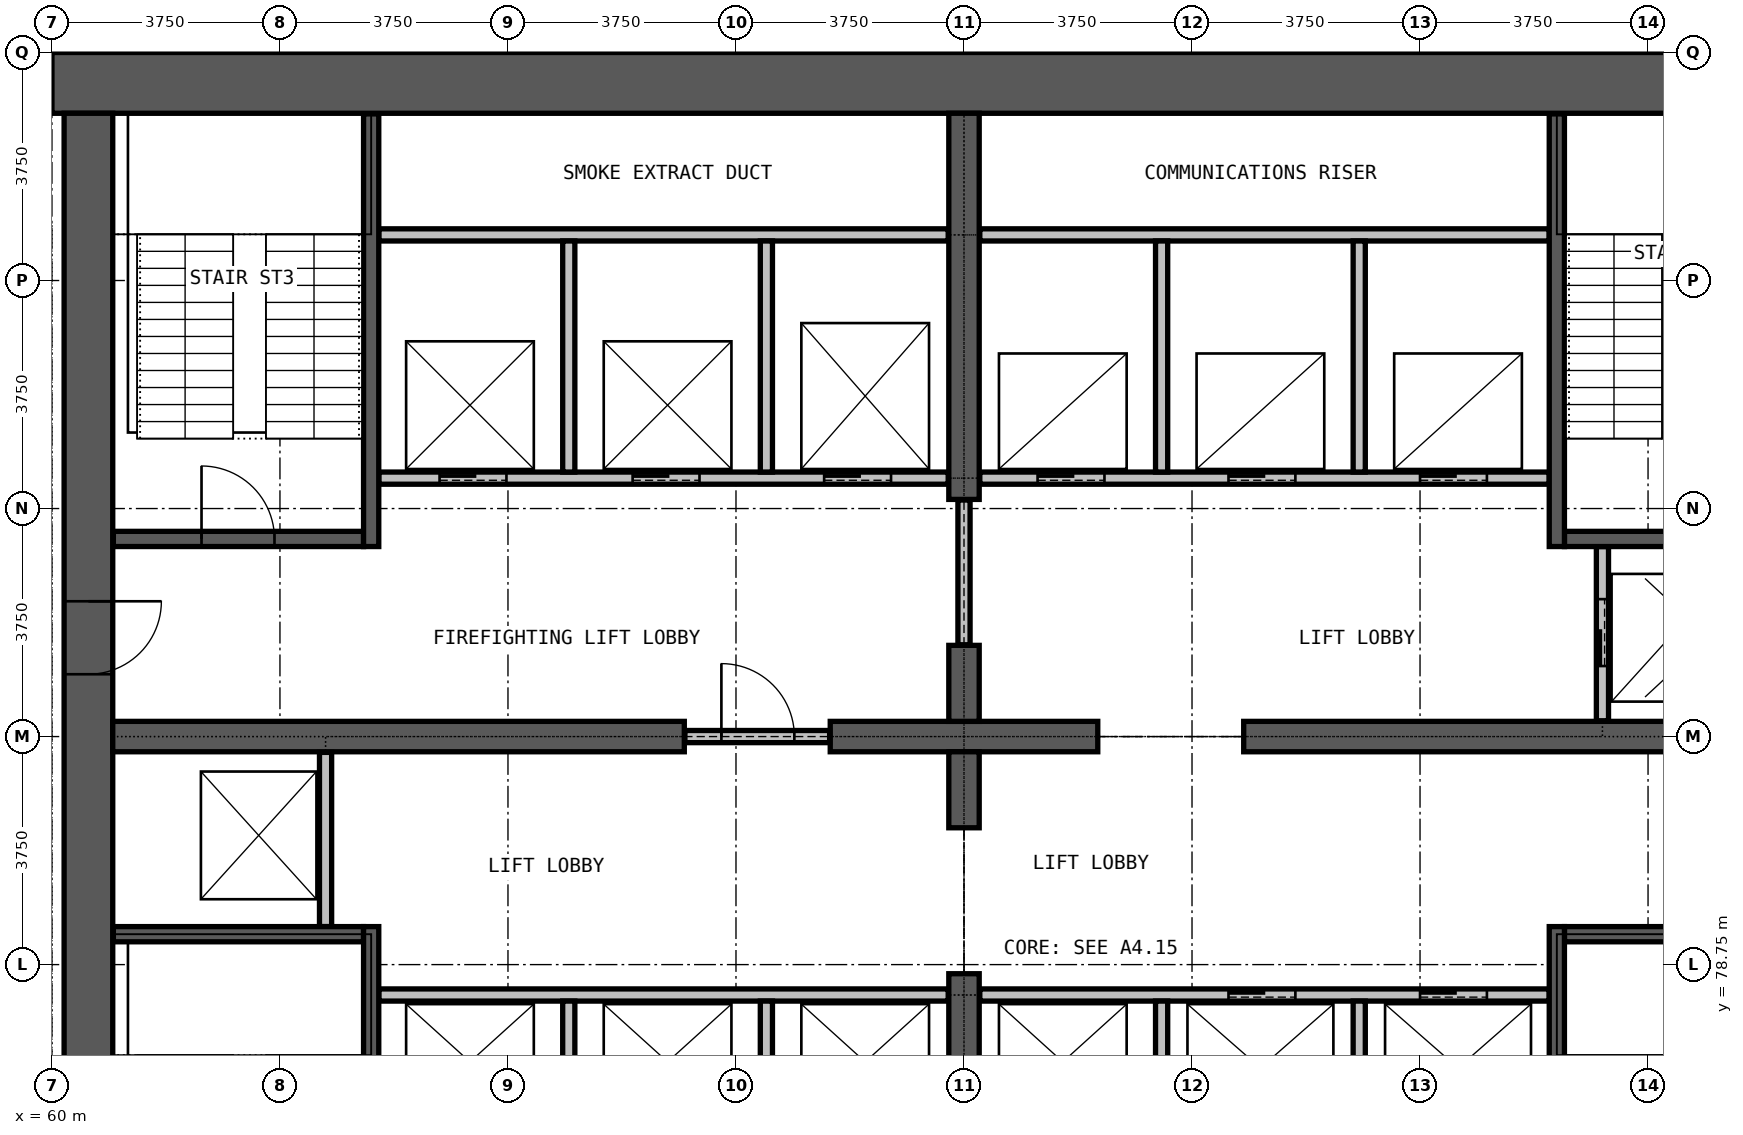
"""IFC4 building model, lengths in metres.
Left out: names, types, materials, properties, quantities, classifications, styles, units other than length and angle.
Written with IfcOpenShell. Run it as: python <this file> out.ifc"""

import sys

from ifc_helpers import new_model, si_unit, direction, frame, frame_2d, origin, place, context, subcontext, project, spatial, rectangle, extrude, element, fill, save


model = new_model("IFC4")
c1 = context("Model", 3, precision=1e-05, world=origin(), true_north=direction((0.0, 1.0)))
c2 = subcontext(c1, "Body", "Model", "MODEL_VIEW")
j1 = project(units=[si_unit("LENGTHUNIT", "METRE"), si_unit("PLANEANGLEUNIT", "RADIAN")], contexts=[c1])
p1 = place(None, origin())
s1 = spatial("IfcSite", under=j1, at=p1, CompositionType="ELEMENT")
p2 = place(p1, origin())
s2 = spatial("IfcBuilding", under=s1, at=p2, CompositionType="ELEMENT")
p3 = place(p2, frame((0.0, 0.0, 143.2)))
s3 = spatial("IfcBuildingStorey", under=s2, at=p3, CompositionType="ELEMENT", Elevation=143.2)
p4 = place(p3, frame((90.0, 93.25, 0.0), z_axis=(0.0, 0.0, 1.0), x_axis=(-1.0, 0.0, 0.0)))
e1 = element("IfcWall", 1, at=p4, inside=s3, PredefinedType="SHEAR", context=c2, shape_type="SweptSolid", body=[
    extrude(rectangle(XDim=30.0, YDim=1.0, at=frame_2d((15.0, 0.0))), origin(), (0.0, 0.0, 1.0), 4.5),
])
p5 = place(p3, frame((60.6, 92.75, 0.0), z_axis=(0.0, 0.0, 1.0), x_axis=(0.0, -1.0, 0.0)))
e2 = element("IfcWall", 2, at=p5, inside=s3, PredefinedType="SHEAR", context=c2, shape_type="SweptSolid", body=[
    extrude(rectangle(XDim=20.5, YDim=0.8, at=frame_2d((10.25, 0.0))), origin(), (0.0, 0.0, 1.0), 4.5),
])
p6 = place(p5, frame((19.025, 0.0, 0.0)))
e3 = element("IfcOpeningElement", 3, at=p6, cuts=e2, PredefinedType="OPENING", context=c2, shape_type="SweptSolid", body=[
    extrude(rectangle(XDim=1.2, YDim=2.2, at=frame_2d((0.6, 1.1))), frame((0.0, 0.41, 0.0), z_axis=(0.0, -1.0, 0.0), x_axis=(1.0, 0.0, 0.0)), (0.0, 0.0, 1.0), 0.82),
])
p7 = place(p5, frame((8.025, 0.0, 0.0)))
e4 = element("IfcOpeningElement", 4, at=p7, cuts=e2, PredefinedType="OPENING", context=c2, shape_type="SweptSolid", body=[
    extrude(rectangle(XDim=1.2, YDim=2.2, at=frame_2d((0.6, 1.1))), frame((0.0, 0.41, 0.0), z_axis=(0.0, -1.0, 0.0), x_axis=(1.0, 0.0, 0.0)), (0.0, 0.0, 1.0), 0.82),
])
p8 = place(p3, frame((61.0, 82.5, 0.0), z_axis=(0.0, 0.0, 1.0), x_axis=(1.0, 0.0, 0.0)))
e5 = element("IfcWall", 5, at=p8, inside=s3, PredefinedType="SHEAR", context=c2, shape_type="SweptSolid", body=[
    extrude(rectangle(XDim=9.4, YDim=0.5, at=frame_2d((4.7, 0.0))), origin(), (0.0, 0.0, 1.0), 4.5),
])
p9 = place(p3, frame((72.8, 82.5, 0.0), z_axis=(0.0, 0.0, 1.0), x_axis=(1.0, 0.0, 0.0)))
e6 = element("IfcWall", 6, at=p9, inside=s3, PredefinedType="SHEAR", context=c2, shape_type="SweptSolid", body=[
    extrude(rectangle(XDim=4.4, YDim=0.5, at=frame_2d((2.2, 0.0))), origin(), (0.0, 0.0, 1.0), 4.5),
])
p10 = place(p3, frame((79.6, 82.5, 0.0), z_axis=(0.0, 0.0, 1.0), x_axis=(1.0, 0.0, 0.0)))
e7 = element("IfcWall", 7, at=p10, inside=s3, PredefinedType="SHEAR", context=c2, shape_type="SweptSolid", body=[
    extrude(rectangle(XDim=9.4, YDim=0.5, at=frame_2d((4.7, 0.0))), origin(), (0.0, 0.0, 1.0), 4.5),
])
p11 = place(p3, frame((75.0, 72.25, 0.0), z_axis=(0.0, 0.0, 1.0), x_axis=(0.0, 1.0, 0.0)))
e8 = element("IfcWall", 8, at=p11, inside=s3, PredefinedType="SHEAR", context=c2, shape_type="SweptSolid", body=[
    extrude(rectangle(XDim=6.35, YDim=0.5, at=frame_2d((3.175, 0.0))), origin(), (0.0, 0.0, 1.0), 4.5),
])
for number, where, z_axis, x_axis in (
    (9, (75.0, 81.0, 0.0), (0.0, 0.0, 1.0), (0.0, 1.0, 0.0)),
    (10, (75.0, 82.75, 0.0), (0.0, 0.0, 1.0), (0.0, 1.0, 0.0)),
):
    element("IfcWall", number, at=place(p3, frame(where, z_axis=z_axis, x_axis=x_axis)), inside=s3, PredefinedType="SHEAR", context=c2, shape_type="SweptSolid", body=[
        extrude(rectangle(XDim=1.25, YDim=0.5, at=frame_2d((0.625, 0.0))), origin(), (0.0, 0.0, 1.0), 4.5),
    ])
p12 = place(p3, frame((75.0, 86.4, 0.0), z_axis=(0.0, 0.0, 1.0), x_axis=(0.0, 1.0, 0.0)))
e11 = element("IfcWall", 11, at=p12, inside=s3, PredefinedType="SHEAR", context=c2, shape_type="SweptSolid", body=[
    extrude(rectangle(XDim=6.35, YDim=0.5, at=frame_2d((3.175, 0.0))), origin(), (0.0, 0.0, 1.0), 4.5),
])
p13 = place(p3, frame((70.41, 82.5, 0.0), z_axis=(0.0, 0.0, 1.0), x_axis=(1.0, 0.0, 0.0)))
e12 = element("IfcWall", 12, at=p13, inside=s3, PredefinedType="PARTITIONING", context=c2, shape_type="SweptSolid", body=[
    extrude(rectangle(XDim=2.38, YDim=0.2, at=frame_2d((1.19, 0.0))), origin(), (0.0, 0.0, 1.0), 2.4),
])
p14 = place(p13, frame((0.6, 0.0, 0.0)))
e13 = element("IfcOpeningElement", 13, at=p14, cuts=e12, PredefinedType="OPENING", context=c2, shape_type="SweptSolid", body=[
    extrude(rectangle(XDim=1.2, YDim=2.2, at=frame_2d((0.6, 1.1))), frame((0.0, 0.11, 0.0), z_axis=(0.0, -1.0, 0.0), x_axis=(1.0, 0.0, 0.0)), (0.0, 0.0, 1.0), 0.22),
])
p15 = place(p3, frame((75.0, 84.01, 0.0), z_axis=(0.0, 0.0, 1.0), x_axis=(0.0, 1.0, 0.0)))
e14 = element("IfcWall", 14, at=p15, inside=s3, PredefinedType="PARTITIONING", context=c2, shape_type="SweptSolid", body=[
    extrude(rectangle(XDim=2.38, YDim=0.2, at=frame_2d((1.19, 0.0))), origin(), (0.0, 0.0, 1.0), 2.4),
])
p16 = place(p3, frame((65.375, 78.25, 0.0), z_axis=(0.0, 0.0, 1.0), x_axis=(1.0, 0.0, 0.0)))
e15 = element("IfcWall", 15, at=p16, inside=s3, PredefinedType="PARTITIONING", context=c2, shape_type="SweptSolid", body=[
    extrude(rectangle(XDim=9.365, YDim=0.2, at=frame_2d((4.683, 0.0))), origin(), (0.0, 0.0, 1.0), 4.2),
])
p17 = place(p3, frame((75.26, 78.25, 0.0), z_axis=(0.0, 0.0, 1.0), x_axis=(1.0, 0.0, 0.0)))
e16 = element("IfcWall", 16, at=p17, inside=s3, PredefinedType="PARTITIONING", context=c2, shape_type="SweptSolid", body=[
    extrude(rectangle(XDim=9.365, YDim=0.2, at=frame_2d((4.683, 0.0))), origin(), (0.0, 0.0, 1.0), 4.2),
])
p18 = place(p17, frame((4.09, 0.0, 0.0)))
e17 = element("IfcOpeningElement", 17, at=p18, cuts=e16, PredefinedType="OPENING", context=c2, shape_type="SweptSolid", body=[
    extrude(rectangle(XDim=1.1, YDim=2.2, at=frame_2d((0.55, 1.1))), frame((0.0, 0.11, 0.0), z_axis=(0.0, -1.0, 0.0), x_axis=(1.0, 0.0, 0.0)), (0.0, 0.0, 1.0), 0.22),
])
p19 = place(p17, frame((7.24, 0.0, 0.0)))
e18 = element("IfcOpeningElement", 18, at=p19, cuts=e16, PredefinedType="OPENING", context=c2, shape_type="SweptSolid", body=[
    extrude(rectangle(XDim=1.1, YDim=2.2, at=frame_2d((0.55, 1.1))), frame((0.0, 0.11, 0.0), z_axis=(0.0, -1.0, 0.0), x_axis=(1.0, 0.0, 0.0)), (0.0, 0.0, 1.0), 0.22),
])
p20 = place(p3, frame((65.375, 86.75, 0.0), z_axis=(0.0, 0.0, 1.0), x_axis=(1.0, 0.0, 0.0)))
e19 = element("IfcWall", 19, at=p20, inside=s3, PredefinedType="PARTITIONING", context=c2, shape_type="SweptSolid", body=[
    extrude(rectangle(XDim=9.365, YDim=0.2, at=frame_2d((4.683, 0.0))), origin(), (0.0, 0.0, 1.0), 4.2),
])
p21 = place(p20, frame((1.0, 0.0, 0.0)))
e20 = element("IfcOpeningElement", 20, at=p21, cuts=e19, PredefinedType="OPENING", context=c2, shape_type="SweptSolid", body=[
    extrude(rectangle(XDim=1.1, YDim=2.2, at=frame_2d((0.55, 1.1))), frame((0.0, 0.11, 0.0), z_axis=(0.0, -1.0, 0.0), x_axis=(1.0, 0.0, 0.0)), (0.0, 0.0, 1.0), 0.22),
])
p22 = place(p20, frame((4.175, 0.0, 0.0)))
e21 = element("IfcOpeningElement", 21, at=p22, cuts=e19, PredefinedType="OPENING", context=c2, shape_type="SweptSolid", body=[
    extrude(rectangle(XDim=1.1, YDim=2.2, at=frame_2d((0.55, 1.1))), frame((0.0, 0.11, 0.0), z_axis=(0.0, -1.0, 0.0), x_axis=(1.0, 0.0, 0.0)), (0.0, 0.0, 1.0), 0.22),
])
p23 = place(p20, frame((7.325, 0.0, 0.0)))
e22 = element("IfcOpeningElement", 22, at=p23, cuts=e19, PredefinedType="OPENING", context=c2, shape_type="SweptSolid", body=[
    extrude(rectangle(XDim=1.1, YDim=2.2, at=frame_2d((0.55, 1.1))), frame((0.0, 0.11, 0.0), z_axis=(0.0, -1.0, 0.0), x_axis=(1.0, 0.0, 0.0)), (0.0, 0.0, 1.0), 0.22),
])
p24 = place(p3, frame((75.26, 86.75, 0.0), z_axis=(0.0, 0.0, 1.0), x_axis=(1.0, 0.0, 0.0)))
e23 = element("IfcWall", 23, at=p24, inside=s3, PredefinedType="PARTITIONING", context=c2, shape_type="SweptSolid", body=[
    extrude(rectangle(XDim=9.365, YDim=0.2, at=frame_2d((4.683, 0.0))), origin(), (0.0, 0.0, 1.0), 4.2),
])
p25 = place(p24, frame((0.95, 0.0, 0.0)))
e24 = element("IfcOpeningElement", 24, at=p25, cuts=e23, PredefinedType="OPENING", context=c2, shape_type="SweptSolid", body=[
    extrude(rectangle(XDim=1.1, YDim=2.2, at=frame_2d((0.55, 1.1))), frame((0.0, 0.11, 0.0), z_axis=(0.0, -1.0, 0.0), x_axis=(1.0, 0.0, 0.0)), (0.0, 0.0, 1.0), 0.22),
])
p26 = place(p24, frame((4.09, 0.0, 0.0)))
e25 = element("IfcOpeningElement", 25, at=p26, cuts=e23, PredefinedType="OPENING", context=c2, shape_type="SweptSolid", body=[
    extrude(rectangle(XDim=1.1, YDim=2.2, at=frame_2d((0.55, 1.1))), frame((0.0, 0.11, 0.0), z_axis=(0.0, -1.0, 0.0), x_axis=(1.0, 0.0, 0.0)), (0.0, 0.0, 1.0), 0.22),
])
p27 = place(p24, frame((7.24, 0.0, 0.0)))
e26 = element("IfcOpeningElement", 26, at=p27, cuts=e23, PredefinedType="OPENING", context=c2, shape_type="SweptSolid", body=[
    extrude(rectangle(XDim=1.1, YDim=2.2, at=frame_2d((0.55, 1.1))), frame((0.0, 0.11, 0.0), z_axis=(0.0, -1.0, 0.0), x_axis=(1.0, 0.0, 0.0)), (0.0, 0.0, 1.0), 0.22),
])
for number, where, z_axis, x_axis in (
    (27, (65.375, 90.75, 0.0), (0.0, 0.0, 1.0), (1.0, 0.0, 0.0)),
    (28, (75.26, 90.75, 0.0), (0.0, 0.0, 1.0), (1.0, 0.0, 0.0)),
):
    element("IfcWall", number, at=place(p3, frame(where, z_axis=z_axis, x_axis=x_axis)), inside=s3, PredefinedType="PARTITIONING", context=c2, shape_type="SweptSolid", body=[
        extrude(rectangle(XDim=9.365, YDim=0.2, at=frame_2d((4.683, 0.0))), origin(), (0.0, 0.0, 1.0), 4.2),
    ])
p28 = place(p3, frame((64.5, 79.375, 0.0), z_axis=(0.0, 0.0, 1.0), x_axis=(0.0, 1.0, 0.0)))
e29 = element("IfcWall", 29, at=p28, inside=s3, PredefinedType="PARTITIONING", context=c2, shape_type="SweptSolid", body=[
    extrude(rectangle(XDim=2.865, YDim=0.2, at=frame_2d((1.433, 0.0))), origin(), (0.0, 0.0, 1.0), 4.2),
])
for number, where, z_axis, x_axis in (
    (30, (68.5, 74.35, 0.0), (0.0, 0.0, 1.0), (0.0, 1.0, 0.0)),
    (31, (68.5, 86.85, 0.0), (0.0, 0.0, 1.0), (0.0, 1.0, 0.0)),
    (32, (71.75, 74.35, 0.0), (0.0, 0.0, 1.0), (0.0, 1.0, 0.0)),
    (33, (71.75, 86.85, 0.0), (0.0, 0.0, 1.0), (0.0, 1.0, 0.0)),
    (34, (78.25, 74.35, 0.0), (0.0, 0.0, 1.0), (0.0, 1.0, 0.0)),
    (35, (78.25, 86.85, 0.0), (0.0, 0.0, 1.0), (0.0, 1.0, 0.0)),
    (36, (81.5, 74.35, 0.0), (0.0, 0.0, 1.0), (0.0, 1.0, 0.0)),
    (37, (81.5, 86.85, 0.0), (0.0, 0.0, 1.0), (0.0, 1.0, 0.0)),
):
    element("IfcWall", number, at=place(p3, frame(where, z_axis=z_axis, x_axis=x_axis)), inside=s3, PredefinedType="PARTITIONING", context=c2, shape_type="SweptSolid", body=[
        extrude(rectangle(XDim=3.8, YDim=0.2, at=frame_2d((1.9, 0.0))), origin(), (0.0, 0.0, 1.0), 4.2),
    ])
p29 = place(p3, frame((85.5, 82.76, 0.0), z_axis=(0.0, 0.0, 1.0), x_axis=(0.0, 1.0, 0.0)))
e38 = element("IfcWall", 38, at=p29, inside=s3, PredefinedType="PARTITIONING", context=c2, shape_type="SweptSolid", body=[
    extrude(rectangle(XDim=2.865, YDim=0.2, at=frame_2d((1.433, 0.0))), origin(), (0.0, 0.0, 1.0), 4.2),
])
p30 = place(p29, frame((0.9, 0.0, 0.0)))
e39 = element("IfcOpeningElement", 39, at=p30, cuts=e38, PredefinedType="OPENING", context=c2, shape_type="SweptSolid", body=[
    extrude(rectangle(XDim=1.1, YDim=2.2, at=frame_2d((0.55, 1.1))), frame((0.0, 0.11, 0.0), z_axis=(0.0, -1.0, 0.0), x_axis=(1.0, 0.0, 0.0)), (0.0, 0.0, 1.0), 0.22),
])
p31 = place(p3, frame((61.01, 79.25, 0.0), z_axis=(0.0, 0.0, 1.0), x_axis=(1.0, 0.0, 0.0)))
e40 = element("IfcWall", 40, at=p31, inside=s3, PredefinedType="PARTITIONING", context=c2, shape_type="SweptSolid", body=[
    extrude(rectangle(XDim=4.115, YDim=0.25, at=frame_2d((2.058, 0.0))), origin(), (0.0, 0.0, 1.0), 4.2),
])
p32 = place(p3, frame((84.875, 79.25, 0.0), z_axis=(0.0, 0.0, 1.0), x_axis=(1.0, 0.0, 0.0)))
e41 = element("IfcWall", 41, at=p32, inside=s3, PredefinedType="PARTITIONING", context=c2, shape_type="SweptSolid", body=[
    extrude(rectangle(XDim=4.125, YDim=0.25, at=frame_2d((2.062, 0.0))), origin(), (0.0, 0.0, 1.0), 4.2),
])
p33 = place(p3, frame((61.01, 85.75, 0.0), z_axis=(0.0, 0.0, 1.0), x_axis=(1.0, 0.0, 0.0)))
e42 = element("IfcWall", 42, at=p33, inside=s3, PredefinedType="PARTITIONING", context=c2, shape_type="SweptSolid", body=[
    extrude(rectangle(XDim=4.115, YDim=0.25, at=frame_2d((2.058, 0.0))), origin(), (0.0, 0.0, 1.0), 4.2),
])
p34 = place(p33, frame((1.45, 0.0, 0.0)))
e43 = element("IfcOpeningElement", 43, at=p34, cuts=e42, PredefinedType="OPENING", context=c2, shape_type="SweptSolid", body=[
    extrude(rectangle(XDim=1.2, YDim=2.2, at=frame_2d((0.6, 1.1))), frame((0.0, 0.135, 0.0), z_axis=(0.0, -1.0, 0.0), x_axis=(1.0, 0.0, 0.0)), (0.0, 0.0, 1.0), 0.27),
])
p35 = place(p3, frame((84.875, 85.75, 0.0), z_axis=(0.0, 0.0, 1.0), x_axis=(1.0, 0.0, 0.0)))
e44 = element("IfcWall", 44, at=p35, inside=s3, PredefinedType="PARTITIONING", context=c2, shape_type="SweptSolid", body=[
    extrude(rectangle(XDim=4.125, YDim=0.25, at=frame_2d((2.062, 0.0))), origin(), (0.0, 0.0, 1.0), 4.2),
])
p36 = place(p3, frame((65.25, 72.25, 0.0), z_axis=(0.0, 0.0, 1.0), x_axis=(0.0, 1.0, 0.0)))
e45 = element("IfcWall", 45, at=p36, inside=s3, PredefinedType="PARTITIONING", context=c2, shape_type="SweptSolid", body=[
    extrude(rectangle(XDim=7.125, YDim=0.25, at=frame_2d((3.562, 0.0))), origin(), (0.0, 0.0, 1.0), 4.2),
])
p37 = place(p3, frame((65.25, 85.625, 0.0), z_axis=(0.0, 0.0, 1.0), x_axis=(0.0, 1.0, 0.0)))
e46 = element("IfcWall", 46, at=p37, inside=s3, PredefinedType="PARTITIONING", context=c2, shape_type="SweptSolid", body=[
    extrude(rectangle(XDim=7.115, YDim=0.25, at=frame_2d((3.558, 0.0))), origin(), (0.0, 0.0, 1.0), 4.2),
])
p38 = place(p3, frame((84.75, 72.25, 0.0), z_axis=(0.0, 0.0, 1.0), x_axis=(0.0, 1.0, 0.0)))
e47 = element("IfcWall", 47, at=p38, inside=s3, PredefinedType="PARTITIONING", context=c2, shape_type="SweptSolid", body=[
    extrude(rectangle(XDim=7.125, YDim=0.25, at=frame_2d((3.562, 0.0))), origin(), (0.0, 0.0, 1.0), 4.2),
])
p39 = place(p3, frame((84.75, 85.625, 0.0), z_axis=(0.0, 0.0, 1.0), x_axis=(0.0, 1.0, 0.0)))
e48 = element("IfcWall", 48, at=p39, inside=s3, PredefinedType="PARTITIONING", context=c2, shape_type="SweptSolid", body=[
    extrude(rectangle(XDim=7.115, YDim=0.25, at=frame_2d((3.558, 0.0))), origin(), (0.0, 0.0, 1.0), 4.2),
])
p40 = place(p18, origin())
e49 = element("IfcDoor", 49, at=p40, inside=s3, OperationType="DOUBLE_DOOR_SLIDING", PredefinedType="DOOR", context=c2, shape_type="SweptSolid", body=[
    extrude(rectangle(XDim=1.1, YDim=2.2, at=frame_2d((0.55, 1.1))), frame((0.0, 0.025, 0.0), z_axis=(0.0, -1.0, 0.0), x_axis=(1.0, 0.0, 0.0)), (0.0, 0.0, 1.0), 0.05),
])
fill(e17, e49)
p41 = place(p19, origin())
e50 = element("IfcDoor", 50, at=p41, inside=s3, OperationType="DOUBLE_DOOR_SLIDING", PredefinedType="DOOR", context=c2, shape_type="SweptSolid", body=[
    extrude(rectangle(XDim=1.1, YDim=2.2, at=frame_2d((0.55, 1.1))), frame((0.0, 0.025, 0.0), z_axis=(0.0, -1.0, 0.0), x_axis=(1.0, 0.0, 0.0)), (0.0, 0.0, 1.0), 0.05),
])
fill(e18, e50)
p42 = place(p25, origin())
e51 = element("IfcDoor", 51, at=p42, inside=s3, OperationType="DOUBLE_DOOR_SLIDING", PredefinedType="DOOR", context=c2, shape_type="SweptSolid", body=[
    extrude(rectangle(XDim=1.1, YDim=2.2, at=frame_2d((0.55, 1.1))), frame((0.0, 0.025, 0.0), z_axis=(0.0, -1.0, 0.0), x_axis=(1.0, 0.0, 0.0)), (0.0, 0.0, 1.0), 0.05),
])
fill(e24, e51)
p43 = place(p26, origin())
e52 = element("IfcDoor", 52, at=p43, inside=s3, OperationType="DOUBLE_DOOR_SLIDING", PredefinedType="DOOR", context=c2, shape_type="SweptSolid", body=[
    extrude(rectangle(XDim=1.1, YDim=2.2, at=frame_2d((0.55, 1.1))), frame((0.0, 0.025, 0.0), z_axis=(0.0, -1.0, 0.0), x_axis=(1.0, 0.0, 0.0)), (0.0, 0.0, 1.0), 0.05),
])
fill(e25, e52)
p44 = place(p27, origin())
e53 = element("IfcDoor", 53, at=p44, inside=s3, OperationType="DOUBLE_DOOR_SLIDING", PredefinedType="DOOR", context=c2, shape_type="SweptSolid", body=[
    extrude(rectangle(XDim=1.1, YDim=2.2, at=frame_2d((0.55, 1.1))), frame((0.0, 0.025, 0.0), z_axis=(0.0, -1.0, 0.0), x_axis=(1.0, 0.0, 0.0)), (0.0, 0.0, 1.0), 0.05),
])
fill(e26, e53)
p45 = place(p21, origin())
e54 = element("IfcDoor", 54, at=p45, inside=s3, OperationType="DOUBLE_DOOR_SLIDING", PredefinedType="DOOR", context=c2, shape_type="SweptSolid", body=[
    extrude(rectangle(XDim=1.1, YDim=2.2, at=frame_2d((0.55, 1.1))), frame((0.0, 0.025, 0.0), z_axis=(0.0, -1.0, 0.0), x_axis=(1.0, 0.0, 0.0)), (0.0, 0.0, 1.0), 0.05),
])
fill(e20, e54)
p46 = place(p22, origin())
e55 = element("IfcDoor", 55, at=p46, inside=s3, OperationType="DOUBLE_DOOR_SLIDING", PredefinedType="DOOR", context=c2, shape_type="SweptSolid", body=[
    extrude(rectangle(XDim=1.1, YDim=2.2, at=frame_2d((0.55, 1.1))), frame((0.0, 0.025, 0.0), z_axis=(0.0, -1.0, 0.0), x_axis=(1.0, 0.0, 0.0)), (0.0, 0.0, 1.0), 0.05),
])
fill(e21, e55)
p47 = place(p23, origin())
e56 = element("IfcDoor", 56, at=p47, inside=s3, OperationType="DOUBLE_DOOR_SLIDING", PredefinedType="DOOR", context=c2, shape_type="SweptSolid", body=[
    extrude(rectangle(XDim=1.1, YDim=2.2, at=frame_2d((0.55, 1.1))), frame((0.0, 0.025, 0.0), z_axis=(0.0, -1.0, 0.0), x_axis=(1.0, 0.0, 0.0)), (0.0, 0.0, 1.0), 0.05),
])
fill(e22, e56)
p48 = place(p30, origin())
e57 = element("IfcDoor", 57, at=p48, inside=s3, OperationType="DOUBLE_DOOR_SLIDING", PredefinedType="DOOR", context=c2, shape_type="SweptSolid", body=[
    extrude(rectangle(XDim=1.1, YDim=2.2, at=frame_2d((0.55, 1.1))), frame((0.0, 0.025, 0.0), z_axis=(0.0, -1.0, 0.0), x_axis=(1.0, 0.0, 0.0)), (0.0, 0.0, 1.0), 0.05),
])
fill(e39, e57)
p49 = place(p14, origin())
e58 = element("IfcDoor", 58, at=p49, inside=s3, OperationType="SINGLE_SWING_LEFT", PredefinedType="DOOR", context=c2, shape_type="SweptSolid", body=[
    extrude(rectangle(XDim=1.2, YDim=2.2, at=frame_2d((0.6, 1.1))), frame((0.0, 0.025, 0.0), z_axis=(0.0, -1.0, 0.0), x_axis=(1.0, 0.0, 0.0)), (0.0, 0.0, 1.0), 0.05),
])
fill(e13, e58)
p50 = place(p34, origin())
e59 = element("IfcDoor", 59, at=p50, inside=s3, OperationType="SINGLE_SWING_LEFT", PredefinedType="DOOR", context=c2, shape_type="SweptSolid", body=[
    extrude(rectangle(XDim=1.2, YDim=2.2, at=frame_2d((0.6, 1.1))), frame((0.0, 0.025, 0.0), z_axis=(0.0, -1.0, 0.0), x_axis=(1.0, 0.0, 0.0)), (0.0, 0.0, 1.0), 0.05),
])
fill(e43, e59)
p51 = place(p7, origin())
e60 = element("IfcDoor", 60, at=p51, inside=s3, OperationType="SINGLE_SWING_LEFT", PredefinedType="DOOR", context=c2, shape_type="SweptSolid", body=[
    extrude(rectangle(XDim=1.2, YDim=2.2, at=frame_2d((0.6, 1.1))), frame((0.0, 0.025, 0.0), z_axis=(0.0, -1.0, 0.0), x_axis=(1.0, 0.0, 0.0)), (0.0, 0.0, 1.0), 0.05),
])
fill(e4, e60)
save(model, sys.argv[1])
